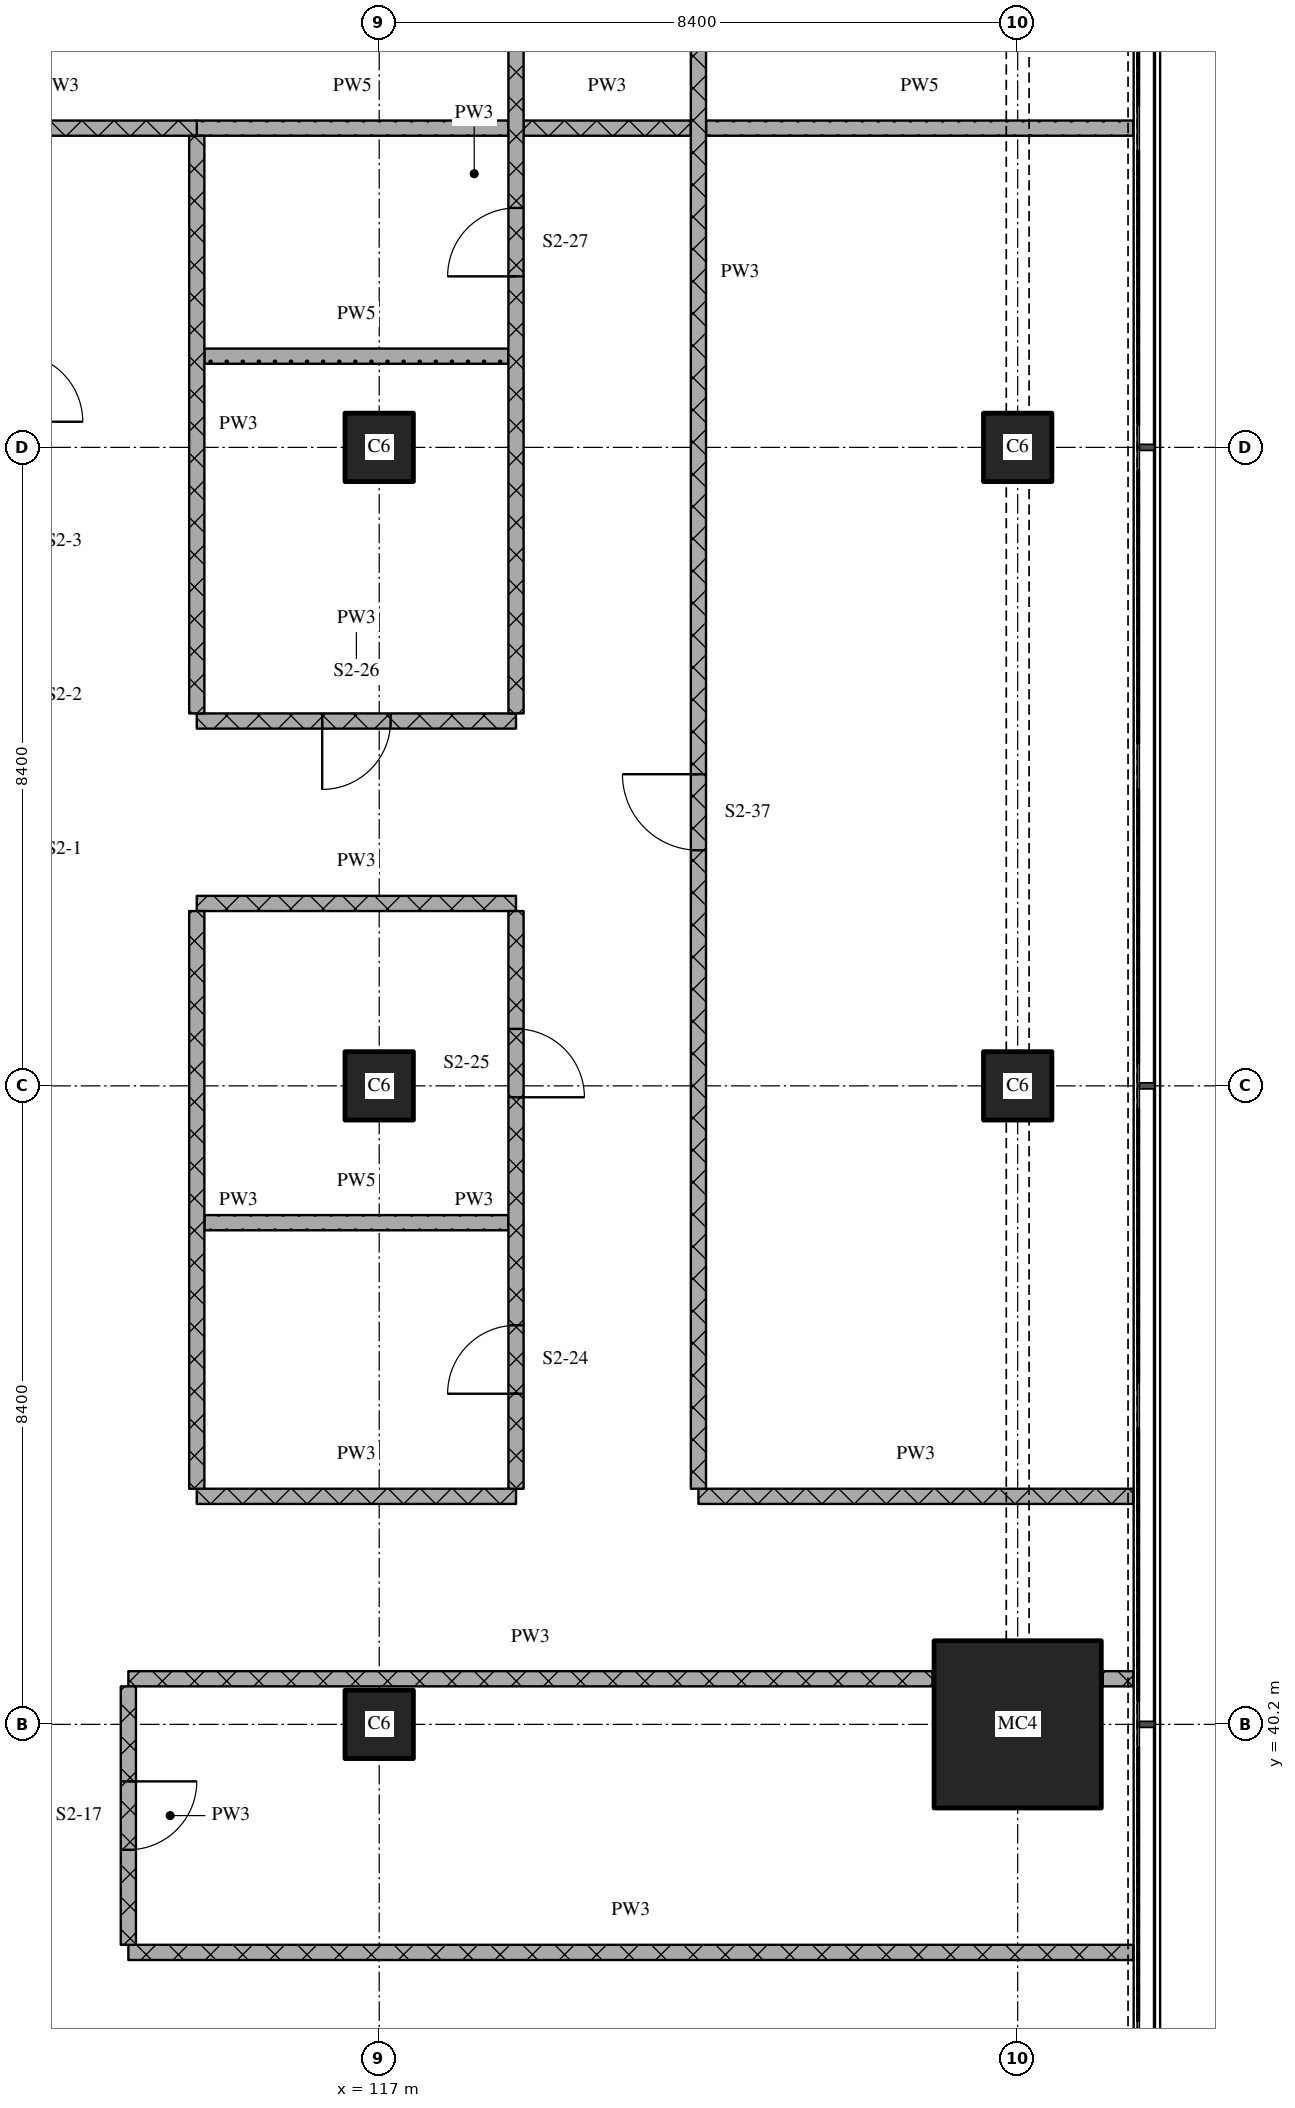
"""IFC4 building model, lengths in metres.
Left out: names, types, materials, properties, quantities, classifications, styles, units other than length and angle.
Written with IfcOpenShell. Run it as: python <this file> out.ifc"""

import sys

from ifc_helpers import new_model, si_unit, direction, frame, frame_2d, origin, origin_2d, place, context, subcontext, project, spatial, rectangle, extrude, element, fill, save


model = new_model("IFC4")
c1 = context("Model", 3, precision=1e-05, world=origin(), true_north=direction((0.0, 1.0)))
c2 = subcontext(c1, "Body", "Model", "MODEL_VIEW")
j1 = project(units=[si_unit("LENGTHUNIT", "METRE"), si_unit("PLANEANGLEUNIT", "RADIAN")], contexts=[c1])
p1 = place(None, origin())
s1 = spatial("IfcSite", under=j1, at=p1, CompositionType="ELEMENT")
p2 = place(p1, origin())
s2 = spatial("IfcBuilding", under=s1, at=p2, CompositionType="ELEMENT")
p3 = place(p2, frame((0.0, 0.0, 32.7)))
s3 = spatial("IfcBuildingStorey", under=s2, at=p3, CompositionType="ELEMENT", Elevation=32.7)
for number, where, z_axis, x_axis in (
    (1, (117.0, 40.2, 0.0), (0.0, 0.0, 1.0), (1.0, 0.0, 0.0)),
    (2, (117.0, 48.6, 0.0), (0.0, 0.0, 1.0), (1.0, 0.0, 0.0)),
    (3, (117.0, 57.0, 0.0), (0.0, 0.0, 1.0), (1.0, 0.0, 0.0)),
):
    element("IfcColumn", number, at=place(p3, frame(where, z_axis=z_axis, x_axis=x_axis)), inside=s3, PredefinedType="COLUMN", context=c2, shape_type="SweptSolid", body=[
        extrude(rectangle(XDim=0.9, YDim=0.9, at=origin_2d()), origin(), (0.0, 0.0, 1.0), 4.5),
    ])
p4 = place(p3, frame((125.4, 40.2, 0.0), z_axis=(0.0, 0.0, 1.0), x_axis=(1.0, 0.0, 0.0)))
e4 = element("IfcColumn", 4, at=p4, inside=s3, PredefinedType="COLUMN", context=c2, shape_type="SweptSolid", body=[
    extrude(rectangle(XDim=2.2, YDim=2.2, at=origin_2d()), origin(), (0.0, 0.0, 1.0), 4.5),
])
for number, where, z_axis, x_axis in (
    (5, (125.4, 48.6, 0.0), (0.0, 0.0, 1.0), (1.0, 0.0, 0.0)),
    (6, (125.4, 57.0, 0.0), (0.0, 0.0, 1.0), (1.0, 0.0, 0.0)),
):
    element("IfcColumn", number, at=place(p3, frame(where, z_axis=z_axis, x_axis=x_axis)), inside=s3, PredefinedType="COLUMN", context=c2, shape_type="SweptSolid", body=[
        extrude(rectangle(XDim=0.9, YDim=0.9, at=origin_2d()), origin(), (0.0, 0.0, 1.0), 4.5),
    ])
p5 = place(p3, frame((113.7, 37.2, 0.0), z_axis=(0.0, 0.0, 1.0), x_axis=(1.0, 0.0, 0.0)))
e7 = element("IfcWall", 7, at=p5, inside=s3, PredefinedType="PARTITIONING", context=c2, shape_type="SweptSolid", body=[
    extrude(rectangle(XDim=13.22, YDim=0.2, at=frame_2d((6.61, 0.0))), origin(), (0.0, 0.0, 1.0), 4.22),
])
p6 = place(p3, frame((113.7, 40.8, 0.0), z_axis=(0.0, 0.0, 1.0), x_axis=(1.0, 0.0, 0.0)))
e8 = element("IfcWall", 8, at=p6, inside=s3, PredefinedType="PARTITIONING", context=c2, shape_type="SweptSolid", body=[
    extrude(rectangle(XDim=10.58, YDim=0.2, at=frame_2d((5.29, 0.0))), origin(), (0.0, 0.0, 1.0), 4.22),
])
p7 = place(p3, frame((126.52, 40.8, 0.0), z_axis=(0.0, 0.0, 1.0), x_axis=(1.0, 0.0, 0.0)))
e9 = element("IfcWall", 9, at=p7, inside=s3, PredefinedType="PARTITIONING", context=c2, shape_type="SweptSolid", body=[
    extrude(rectangle(XDim=0.4, YDim=0.2, at=frame_2d((0.2, 0.0))), origin(), (0.0, 0.0, 1.0), 4.22),
])
p8 = place(p3, frame((114.6, 43.2, 0.0), z_axis=(0.0, 0.0, 1.0), x_axis=(1.0, 0.0, 0.0)))
e10 = element("IfcWall", 10, at=p8, inside=s3, PredefinedType="PARTITIONING", context=c2, shape_type="SweptSolid", body=[
    extrude(rectangle(XDim=4.2, YDim=0.2, at=frame_2d((2.1, 0.0))), origin(), (0.0, 0.0, 1.0), 4.22),
])
p9 = place(p3, frame((121.2, 43.2, 0.0), z_axis=(0.0, 0.0, 1.0), x_axis=(1.0, 0.0, 0.0)))
e11 = element("IfcWall", 11, at=p9, inside=s3, PredefinedType="PARTITIONING", context=c2, shape_type="SweptSolid", body=[
    extrude(rectangle(XDim=5.72, YDim=0.2, at=frame_2d((2.86, 0.0))), origin(), (0.0, 0.0, 1.0), 4.22),
])
p10 = place(p3, frame((114.7, 46.8, 0.0), z_axis=(0.0, 0.0, 1.0), x_axis=(1.0, 0.0, 0.0)))
e12 = element("IfcWall", 12, at=p10, inside=s3, PredefinedType="PARTITIONING", context=c2, shape_type="SweptSolid", body=[
    extrude(rectangle(XDim=4.0, YDim=0.2, at=frame_2d((2.0, 0.0))), origin(), (0.0, 0.0, 1.0), 4.22),
])
p11 = place(p3, frame((114.6, 51.0, 0.0), z_axis=(0.0, 0.0, 1.0), x_axis=(1.0, 0.0, 0.0)))
e13 = element("IfcWall", 13, at=p11, inside=s3, PredefinedType="PARTITIONING", context=c2, shape_type="SweptSolid", body=[
    extrude(rectangle(XDim=4.2, YDim=0.2, at=frame_2d((2.1, 0.0))), origin(), (0.0, 0.0, 1.0), 4.22),
])
p12 = place(p3, frame((114.6, 53.4, 0.0), z_axis=(0.0, 0.0, 1.0), x_axis=(1.0, 0.0, 0.0)))
e14 = element("IfcWall", 14, at=p12, inside=s3, PredefinedType="PARTITIONING", context=c2, shape_type="SweptSolid", body=[
    extrude(rectangle(XDim=4.2, YDim=0.2, at=frame_2d((2.1, 0.0))), origin(), (0.0, 0.0, 1.0), 4.22),
])
p13 = place(p12, frame((1.65, 0.0, 0.0)))
e15 = element("IfcOpeningElement", 15, at=p13, cuts=e14, PredefinedType="OPENING", context=c2, shape_type="SweptSolid", body=[
    extrude(rectangle(XDim=0.9, YDim=2.1, at=frame_2d((0.45, 1.05))), frame((0.0, 0.11, 0.0), z_axis=(0.0, -1.0, 0.0), x_axis=(1.0, 0.0, 0.0)), (0.0, 0.0, 1.0), 0.22),
])
p14 = place(p3, frame((114.7, 58.2, 0.0), z_axis=(0.0, 0.0, 1.0), x_axis=(1.0, 0.0, 0.0)))
e16 = element("IfcWall", 16, at=p14, inside=s3, PredefinedType="PARTITIONING", context=c2, shape_type="SweptSolid", body=[
    extrude(rectangle(XDim=4.0, YDim=0.2, at=frame_2d((2.0, 0.0))), origin(), (0.0, 0.0, 1.0), 4.22),
])
p15 = place(p3, frame((111.0, 61.2, 0.0), z_axis=(0.0, 0.0, 1.0), x_axis=(1.0, 0.0, 0.0)))
e17 = element("IfcWall", 17, at=p15, inside=s3, PredefinedType="PARTITIONING", context=c2, shape_type="SweptSolid", body=[
    extrude(rectangle(XDim=3.6, YDim=0.2, at=frame_2d((1.8, 0.0))), origin(), (0.0, 0.0, 1.0), 4.22),
])
p16 = place(p3, frame((118.9, 61.2, 0.0), z_axis=(0.0, 0.0, 1.0), x_axis=(1.0, 0.0, 0.0)))
e18 = element("IfcWall", 18, at=p16, inside=s3, PredefinedType="PARTITIONING", context=c2, shape_type="SweptSolid", body=[
    extrude(rectangle(XDim=2.2, YDim=0.2, at=frame_2d((1.1, 0.0))), origin(), (0.0, 0.0, 1.0), 4.22),
])
p17 = place(p3, frame((114.6, 61.2, 0.0), z_axis=(0.0, 0.0, 1.0), x_axis=(1.0, 0.0, 0.0)))
e19 = element("IfcWall", 19, at=p17, inside=s3, PredefinedType="PARTITIONING", context=c2, shape_type="SweptSolid", body=[
    extrude(rectangle(XDim=4.1, YDim=0.2, at=frame_2d((2.05, 0.0))), origin(), (0.0, 0.0, 1.0), 4.22),
])
p18 = place(p3, frame((121.3, 61.2, 0.0), z_axis=(0.0, 0.0, 1.0), x_axis=(1.0, 0.0, 0.0)))
e20 = element("IfcWall", 20, at=p18, inside=s3, PredefinedType="PARTITIONING", context=c2, shape_type="SweptSolid", body=[
    extrude(rectangle(XDim=5.62, YDim=0.2, at=frame_2d((2.81, 0.0))), origin(), (0.0, 0.0, 1.0), 4.22),
])
p19 = place(p3, frame((113.7, 40.7, 0.0), z_axis=(0.0, 0.0, 1.0), x_axis=(0.0, -1.0, 0.0)))
e21 = element("IfcWall", 21, at=p19, inside=s3, PredefinedType="PARTITIONING", context=c2, shape_type="SweptSolid", body=[
    extrude(rectangle(XDim=3.4, YDim=0.2, at=frame_2d((1.7, 0.0))), origin(), (0.0, 0.0, 1.0), 4.22),
])
p20 = place(p19, frame((1.25, 0.0, 0.0)))
e22 = element("IfcOpeningElement", 22, at=p20, cuts=e21, PredefinedType="OPENING", context=c2, shape_type="SweptSolid", body=[
    extrude(rectangle(XDim=0.9, YDim=2.1, at=frame_2d((0.45, 1.05))), frame((0.0, 0.11, 0.0), z_axis=(0.0, -1.0, 0.0), x_axis=(1.0, 0.0, 0.0)), (0.0, 0.0, 1.0), 0.22),
])
p21 = place(p3, frame((114.6, 50.9, 0.0), z_axis=(0.0, 0.0, 1.0), x_axis=(0.0, -1.0, 0.0)))
e23 = element("IfcWall", 23, at=p21, inside=s3, PredefinedType="PARTITIONING", context=c2, shape_type="SweptSolid", body=[
    extrude(rectangle(XDim=7.6, YDim=0.2, at=frame_2d((3.8, 0.0))), origin(), (0.0, 0.0, 1.0), 4.22),
])
p22 = place(p3, frame((114.6, 61.1, 0.0), z_axis=(0.0, 0.0, 1.0), x_axis=(0.0, -1.0, 0.0)))
e24 = element("IfcWall", 24, at=p22, inside=s3, PredefinedType="PARTITIONING", context=c2, shape_type="SweptSolid", body=[
    extrude(rectangle(XDim=7.6, YDim=0.2, at=frame_2d((3.8, 0.0))), origin(), (0.0, 0.0, 1.0), 4.22),
])
p23 = place(p3, frame((118.8, 43.3, 0.0), z_axis=(0.0, 0.0, 1.0), x_axis=(0.0, 1.0, 0.0)))
e25 = element("IfcWall", 25, at=p23, inside=s3, PredefinedType="PARTITIONING", context=c2, shape_type="SweptSolid", body=[
    extrude(rectangle(XDim=7.6, YDim=0.2, at=frame_2d((3.8, 0.0))), origin(), (0.0, 0.0, 1.0), 4.22),
])
p24 = place(p23, frame((1.25, 0.0, 0.0)))
e26 = element("IfcOpeningElement", 26, at=p24, cuts=e25, PredefinedType="OPENING", context=c2, shape_type="SweptSolid", body=[
    extrude(rectangle(XDim=0.9, YDim=2.1, at=frame_2d((0.45, 1.05))), frame((0.0, 0.11, 0.0), z_axis=(0.0, -1.0, 0.0), x_axis=(1.0, 0.0, 0.0)), (0.0, 0.0, 1.0), 0.22),
])
p25 = place(p23, frame((5.15, 0.0, 0.0)))
e27 = element("IfcOpeningElement", 27, at=p25, cuts=e25, PredefinedType="OPENING", context=c2, shape_type="SweptSolid", body=[
    extrude(rectangle(XDim=0.9, YDim=2.1, at=frame_2d((0.45, 1.05))), frame((0.0, 0.11, 0.0), z_axis=(0.0, -1.0, 0.0), x_axis=(1.0, 0.0, 0.0)), (0.0, 0.0, 1.0), 0.22),
])
p26 = place(p3, frame((118.8, 53.5, 0.0), z_axis=(0.0, 0.0, 1.0), x_axis=(0.0, 1.0, 0.0)))
e28 = element("IfcWall", 28, at=p26, inside=s3, PredefinedType="PARTITIONING", context=c2, shape_type="SweptSolid", body=[
    extrude(rectangle(XDim=14.2, YDim=0.2, at=frame_2d((7.1, 0.0))), origin(), (0.0, 0.0, 1.0), 4.22),
])
p27 = place(p26, frame((5.75, 0.0, 0.0)))
e29 = element("IfcOpeningElement", 29, at=p27, cuts=e28, PredefinedType="OPENING", context=c2, shape_type="SweptSolid", body=[
    extrude(rectangle(XDim=0.9, YDim=2.1, at=frame_2d((0.45, 1.05))), frame((0.0, 0.11, 0.0), z_axis=(0.0, -1.0, 0.0), x_axis=(1.0, 0.0, 0.0)), (0.0, 0.0, 1.0), 0.22),
])
p28 = place(p26, frame((10.55, 0.0, 0.0)))
e30 = element("IfcOpeningElement", 30, at=p28, cuts=e28, PredefinedType="OPENING", context=c2, shape_type="SweptSolid", body=[
    extrude(rectangle(XDim=0.9, YDim=2.1, at=frame_2d((0.45, 1.05))), frame((0.0, 0.11, 0.0), z_axis=(0.0, -1.0, 0.0), x_axis=(1.0, 0.0, 0.0)), (0.0, 0.0, 1.0), 0.22),
])
p29 = place(p3, frame((121.2, 75.32, 0.0), z_axis=(0.0, 0.0, 1.0), x_axis=(0.0, -1.0, 0.0)))
e31 = element("IfcWall", 31, at=p29, inside=s3, PredefinedType="PARTITIONING", context=c2, shape_type="SweptSolid", body=[
    extrude(rectangle(XDim=32.02, YDim=0.2, at=frame_2d((16.01, 0.0))), origin(), (0.0, 0.0, 1.0), 4.22),
])
p30 = place(p29, frame((7.729, 0.0, 0.0)))
e32 = element("IfcOpeningElement", 32, at=p30, cuts=e31, PredefinedType="OPENING", context=c2, shape_type="SweptSolid", body=[
    extrude(rectangle(XDim=1.0, YDim=2.1, at=frame_2d((0.5, 1.05))), frame((0.0, 0.11, 0.0), z_axis=(0.0, -1.0, 0.0), x_axis=(1.0, 0.0, 0.0)), (0.0, 0.0, 1.0), 0.22),
])
p31 = place(p29, frame((22.62, 0.0, 0.0)))
e33 = element("IfcOpeningElement", 33, at=p31, cuts=e31, PredefinedType="OPENING", context=c2, shape_type="SweptSolid", body=[
    extrude(rectangle(XDim=1.0, YDim=2.1, at=frame_2d((0.5, 1.05))), frame((0.0, 0.11, 0.0), z_axis=(0.0, -1.0, 0.0), x_axis=(1.0, 0.0, 0.0)), (0.0, 0.0, 1.0), 0.22),
])
p32 = place(p13, origin())
e34 = element("IfcDoor", 34, at=p32, inside=s3, OperationType="SINGLE_SWING_RIGHT", PredefinedType="DOOR", context=c2, shape_type="SweptSolid", body=[
    extrude(rectangle(XDim=0.9, YDim=2.1, at=frame_2d((0.45, 1.05))), frame((0.0, 0.025, 0.0), z_axis=(0.0, -1.0, 0.0), x_axis=(1.0, 0.0, 0.0)), (0.0, 0.0, 1.0), 0.05),
])
fill(e15, e34)
p33 = place(p20, origin())
e35 = element("IfcDoor", 35, at=p33, inside=s3, OperationType="SINGLE_SWING_LEFT", PredefinedType="DOOR", context=c2, shape_type="SweptSolid", body=[
    extrude(rectangle(XDim=0.9, YDim=2.1, at=frame_2d((0.45, 1.05))), frame((0.0, 0.025, 0.0), z_axis=(0.0, -1.0, 0.0), x_axis=(1.0, 0.0, 0.0)), (0.0, 0.0, 1.0), 0.05),
])
fill(e22, e35)
p34 = place(p24, origin())
e36 = element("IfcDoor", 36, at=p34, inside=s3, OperationType="SINGLE_SWING_LEFT", PredefinedType="DOOR", context=c2, shape_type="SweptSolid", body=[
    extrude(rectangle(XDim=0.9, YDim=2.1, at=frame_2d((0.45, 1.05))), frame((0.0, 0.025, 0.0), z_axis=(0.0, -1.0, 0.0), x_axis=(1.0, 0.0, 0.0)), (0.0, 0.0, 1.0), 0.05),
])
fill(e26, e36)
p35 = place(p25, origin())
e37 = element("IfcDoor", 37, at=p35, inside=s3, OperationType="SINGLE_SWING_RIGHT", PredefinedType="DOOR", context=c2, shape_type="SweptSolid", body=[
    extrude(rectangle(XDim=0.9, YDim=2.1, at=frame_2d((0.45, 1.05))), frame((0.0, 0.025, 0.0), z_axis=(0.0, -1.0, 0.0), x_axis=(1.0, 0.0, 0.0)), (0.0, 0.0, 1.0), 0.05),
])
fill(e27, e37)
p36 = place(p27, origin())
e38 = element("IfcDoor", 38, at=p36, inside=s3, OperationType="SINGLE_SWING_LEFT", PredefinedType="DOOR", context=c2, shape_type="SweptSolid", body=[
    extrude(rectangle(XDim=0.9, YDim=2.1, at=frame_2d((0.45, 1.05))), frame((0.0, 0.025, 0.0), z_axis=(0.0, -1.0, 0.0), x_axis=(1.0, 0.0, 0.0)), (0.0, 0.0, 1.0), 0.05),
])
fill(e29, e38)
p37 = place(p31, origin())
e39 = element("IfcDoor", 39, at=p37, inside=s3, OperationType="SINGLE_SWING_RIGHT", PredefinedType="DOOR", context=c2, shape_type="SweptSolid", body=[
    extrude(rectangle(XDim=1.0, YDim=2.1, at=frame_2d((0.5, 1.05))), frame((0.0, 0.025, 0.0), z_axis=(0.0, -1.0, 0.0), x_axis=(1.0, 0.0, 0.0)), (0.0, 0.0, 1.0), 0.05),
])
fill(e33, e39)
save(model, sys.argv[1])
